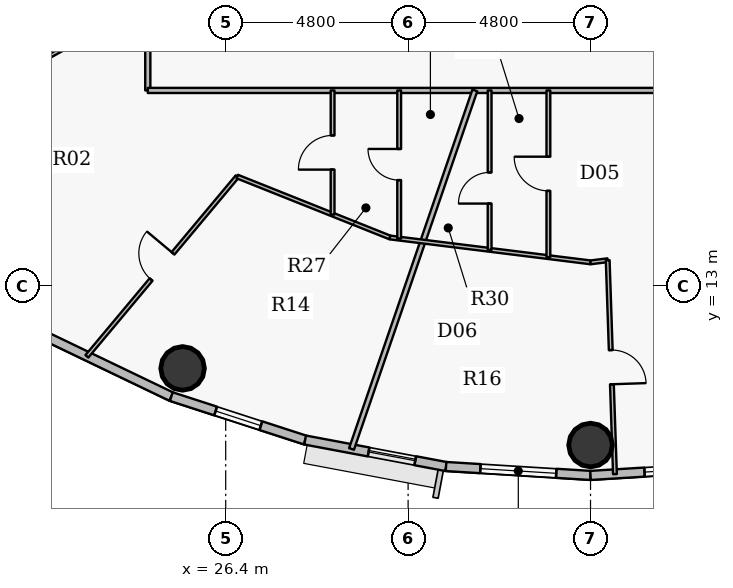
"""IFC4 building model, lengths in metres.
Left out: names, types, materials, properties, quantities, classifications, styles, units other than length and angle.
Written with IfcOpenShell. Run it as: python <this file> out.ifc"""

import sys

from ifc_helpers import new_model, si_unit, direction, frame, frame_2d, origin, origin_2d, place, context, subcontext, project, spatial, rectangle, hollow_circle, extrude, source, transform, mapped, element, fill, save


model = new_model("IFC4")
c1 = context("Model", 3, precision=1e-05, world=origin(), true_north=direction((0.0, 1.0)))
c2 = subcontext(c1, "Body", "Model", "MODEL_VIEW")
j1 = project(units=[si_unit("LENGTHUNIT", "METRE"), si_unit("PLANEANGLEUNIT", "RADIAN")], contexts=[c1])
p1 = place(None, origin())
s1 = spatial("IfcSite", under=j1, at=p1, CompositionType="ELEMENT")
p2 = place(p1, origin())
s2 = spatial("IfcBuilding", under=s1, at=p2, CompositionType="ELEMENT")
p3 = place(p2, frame((0.0, 0.0, 240.3)))
s3 = spatial("IfcBuildingStorey", under=s2, at=p3, CompositionType="ELEMENT", Elevation=240.3)
for number, where, z_axis, x_axis in (
    (1, (25.265, 10.836, 0.0), (0.0, 0.0, 1.0), (1.0, 0.0, 0.0)),
    (2, (36.0, 8.82, 0.0), (0.0, 0.0, 1.0), (1.0, 0.0, 0.0)),
):
    element("IfcColumn", number, at=place(p3, frame(where, z_axis=z_axis, x_axis=x_axis)), inside=s3, PredefinedType="COLUMN", context=c2, shape_type="SweptSolid", body=[
        extrude(hollow_circle(Radius=0.575, WallThickness=0.036, at=origin_2d()), origin(), (0.0, 0.0, 1.0), 3.75),
    ])
p4 = place(p3, frame((24.969, 10.094, 0.0), z_axis=(0.0, 0.0, 1.0), x_axis=(-0.901598104751, 0.432574684313, 0.0)))
e3 = element("IfcWall", 3, at=p4, inside=s3, PredefinedType="SOLIDWALL", context=c2, shape_type="SweptSolid", body=[
    extrude(rectangle(XDim=3.604, YDim=0.24, at=frame_2d((1.802, 0.0))), origin(), (0.0, 0.0, 1.0), 3.5),
])
p5 = place(p3, frame((28.491, 8.951, 0.0), z_axis=(0.0, 0.0, 1.0), x_axis=(-0.951210789182, 0.308541787354, 0.0)))
e4 = element("IfcWall", 4, at=p5, inside=s3, PredefinedType="SOLIDWALL", context=c2, shape_type="SweptSolid", body=[
    extrude(rectangle(XDim=3.702, YDim=0.24, at=frame_2d((1.851, 0.0))), origin(), (0.0, 0.0, 1.0), 3.5),
])
p6 = place(p5, frame((1.226, 0.0, 0.9)))
e5 = element("IfcOpeningElement", 5, at=p6, cuts=e4, PredefinedType="OPENING", context=c2, shape_type="SweptSolid", body=[
    extrude(rectangle(XDim=1.25, YDim=1.65, at=origin_2d()), frame((0.625, 0.13, 0.825), z_axis=(0.0, -1.0, 0.0), x_axis=(1.0, 0.0, 0.0)), (0.0, 0.0, 1.0), 0.26),
])
p7 = place(p3, frame((32.198, 8.254, 0.0), z_axis=(0.0, 0.0, 1.0), x_axis=(-0.982784898575, 0.184753465822, 0.0)))
e6 = element("IfcWall", 6, at=p7, inside=s3, PredefinedType="SOLIDWALL", context=c2, shape_type="SweptSolid", body=[
    extrude(rectangle(XDim=3.773, YDim=0.24, at=frame_2d((1.886, 0.0))), origin(), (0.0, 0.0, 1.0), 3.5),
])
p8 = place(p7, frame((0.824, 0.0, 0.9)))
e7 = element("IfcOpeningElement", 7, at=p8, cuts=e6, PredefinedType="OPENING", context=c2, shape_type="SweptSolid", body=[
    extrude(rectangle(XDim=1.25, YDim=1.65, at=origin_2d()), frame((0.625, 0.13, 0.825), z_axis=(0.0, -1.0, 0.0), x_axis=(1.0, 0.0, 0.0)), (0.0, 0.0, 1.0), 0.26),
])
p9 = place(p3, frame((36.0, 8.02, 0.0), z_axis=(0.0, 0.0, 1.0), x_axis=(-0.998108785312, 0.06147237333, 0.0)))
e8 = element("IfcWall", 8, at=p9, inside=s3, PredefinedType="SOLIDWALL", context=c2, shape_type="SweptSolid", body=[
    extrude(rectangle(XDim=3.809, YDim=0.24, at=frame_2d((1.904, 0.0))), origin(), (0.0, 0.0, 1.0), 3.5),
])
p10 = place(p9, frame((0.904, 0.0, 0.9)))
e9 = element("IfcOpeningElement", 9, at=p10, cuts=e8, PredefinedType="OPENING", context=c2, shape_type="SweptSolid", body=[
    extrude(rectangle(XDim=2.0, YDim=1.75, at=origin_2d()), frame((1.0, 0.13, 0.875), z_axis=(0.0, -1.0, 0.0), x_axis=(1.0, 0.0, 0.0)), (0.0, 0.0, 1.0), 0.26),
])
p11 = place(p3, frame((39.802, 8.254, 0.0), z_axis=(0.0, 0.0, 1.0), x_axis=(-0.998108785312, -0.06147237333, 0.0)))
e10 = element("IfcWall", 10, at=p11, inside=s3, PredefinedType="SOLIDWALL", context=c2, shape_type="SweptSolid", body=[
    extrude(rectangle(XDim=3.809, YDim=0.24, at=frame_2d((1.904, 0.0))), origin(), (0.0, 0.0, 1.0), 3.5),
])
p12 = place(p11, frame((0.785, 0.0, 0.9)))
e11 = element("IfcOpeningElement", 11, at=p12, cuts=e10, PredefinedType="OPENING", context=c2, shape_type="SweptSolid", body=[
    extrude(rectangle(XDim=1.6, YDim=1.75, at=origin_2d()), frame((0.8, 0.13, 0.875), z_axis=(0.0, -1.0, 0.0), x_axis=(1.0, 0.0, 0.0)), (0.0, 0.0, 1.0), 0.26),
])
p13 = place(p3, frame((16.25, 15.977, 0.0), z_axis=(0.0, 0.0, 1.0), x_axis=(0.87319302211, 0.487374543999, 0.0)))
e12 = element("IfcWall", 12, at=p13, inside=s3, PredefinedType="PARTITIONING", context=c2, shape_type="SweptSolid", body=[
    extrude(rectangle(XDim=6.712, YDim=0.1, at=frame_2d((3.356, 0.0))), origin(), (0.0, 0.0, 1.0), 2.985),
])
p14 = place(p13, frame((2.906, 0.0, 0.0)))
e13 = element("IfcOpeningElement", 13, at=p14, cuts=e12, PredefinedType="OPENING", context=c2, shape_type="SweptSolid", body=[
    extrude(rectangle(XDim=0.9, YDim=2.1, at=origin_2d()), frame((0.45, 0.06, 1.05), z_axis=(0.0, -1.0, 0.0), x_axis=(1.0, 0.0, 0.0)), (0.0, 0.0, 1.0), 0.12),
])
p15 = place(p3, frame((22.747, 11.154, 0.0), z_axis=(0.0, 0.0, 1.0), x_axis=(0.641565789242, 0.767068013982, 0.0)))
e14 = element("IfcWall", 14, at=p15, inside=s3, PredefinedType="PARTITIONING", context=c2, shape_type="SweptSolid", body=[
    extrude(rectangle(XDim=6.167, YDim=0.1, at=frame_2d((3.083, 0.0))), origin(), (0.0, 0.0, 1.0), 2.985),
])
p16 = place(p15, frame((2.633, 0.0, 0.0)))
e15 = element("IfcOpeningElement", 15, at=p16, cuts=e14, PredefinedType="OPENING", context=c2, shape_type="SweptSolid", body=[
    extrude(rectangle(XDim=0.9, YDim=2.1, at=origin_2d()), frame((0.45, 0.06, 1.05), z_axis=(0.0, -1.0, 0.0), x_axis=(1.0, 0.0, 0.0)), (0.0, 0.0, 1.0), 0.12),
])
p17 = place(p3, frame((24.35, 18.15, 0.0), z_axis=(0.0, 0.0, 1.0), x_axis=(0.0, 1.0, 0.0)))
e16 = element("IfcWall", 16, at=p17, inside=s3, PredefinedType="PARTITIONING", context=c2, shape_type="SweptSolid", body=[
    extrude(rectangle(XDim=7.163, YDim=0.135, at=frame_2d((3.581, 0.0))), origin(), (0.0, 0.0, 1.0), 2.935),
])
p18 = place(p17, frame((3.081, 0.0, 0.0)))
e17 = element("IfcOpeningElement", 17, at=p18, cuts=e16, PredefinedType="OPENING", context=c2, shape_type="SweptSolid", body=[
    extrude(rectangle(XDim=1.0, YDim=2.15, at=origin_2d()), frame((0.5, 0.078, 1.075), z_axis=(0.0, -1.0, 0.0), x_axis=(1.0, 0.0, 0.0)), (0.0, 0.0, 1.0), 0.155),
])
p19 = place(p3, frame((24.35, 18.15, 0.0), z_axis=(0.0, 0.0, 1.0), x_axis=(1.0, 0.0, 0.0)))
e18 = element("IfcWall", 18, at=p19, inside=s3, PredefinedType="PARTITIONING", context=c2, shape_type="SweptSolid", body=[
    extrude(rectangle(XDim=23.85, YDim=0.135, at=frame_2d((11.925, 0.0))), origin(), (0.0, 0.0, 1.0), 2.935),
])
p20 = place(p19, frame((14.838, 0.0, 0.0)))
e19 = element("IfcOpeningElement", 19, at=p20, cuts=e18, PredefinedType="OPENING", context=c2, shape_type="SweptSolid", body=[
    extrude(rectangle(XDim=1.0, YDim=2.15, at=origin_2d()), frame((0.5, 0.078, 1.075), z_axis=(0.0, -1.0, 0.0), x_axis=(1.0, 0.0, 0.0)), (0.0, 0.0, 1.0), 0.155),
])
p21 = place(p19, frame((21.472, 0.0, 0.0)))
e20 = element("IfcOpeningElement", 20, at=p21, cuts=e18, PredefinedType="OPENING", context=c2, shape_type="SweptSolid", body=[
    extrude(rectangle(XDim=1.0, YDim=2.15, at=origin_2d()), frame((0.5, 0.078, 1.075), z_axis=(0.0, -1.0, 0.0), x_axis=(1.0, 0.0, 0.0)), (0.0, 0.0, 1.0), 0.155),
])
p22 = place(p3, frame((26.703, 15.884, 0.0), z_axis=(0.0, 0.0, 1.0), x_axis=(0.928807108231, -0.370563564991, 0.0)))
e21 = element("IfcWall", 21, at=p22, inside=s3, PredefinedType="PARTITIONING", context=c2, shape_type="SweptSolid", body=[
    extrude(rectangle(XDim=4.327, YDim=0.1, at=frame_2d((2.163, 0.0))), origin(), (0.0, 0.0, 1.0), 2.935),
])
p23 = place(p3, frame((29.213, 14.883, 0.0), z_axis=(0.0, 0.0, 1.0), x_axis=(0.0, 1.0, 0.0)))
e22 = element("IfcWall", 22, at=p23, inside=s3, PredefinedType="PARTITIONING", context=c2, shape_type="SweptSolid", body=[
    extrude(rectangle(XDim=3.267, YDim=0.1, at=frame_2d((1.633, 0.0))), origin(), (0.0, 0.0, 1.0), 2.935),
])
p24 = place(p23, frame((1.183, 0.0, 0.0)))
e23 = element("IfcOpeningElement", 23, at=p24, cuts=e22, PredefinedType="OPENING", context=c2, shape_type="SweptSolid", body=[
    extrude(rectangle(XDim=0.9, YDim=2.1, at=origin_2d()), frame((0.45, 0.06, 1.05), z_axis=(0.0, -1.0, 0.0), x_axis=(1.0, 0.0, 0.0)), (0.0, 0.0, 1.0), 0.12),
])
p25 = place(p3, frame((29.711, 8.717, 0.0), z_axis=(0.0, 0.0, 1.0), x_axis=(0.325280852175, 0.945617452889, 0.0)))
e24 = element("IfcWall", 24, at=p25, inside=s3, PredefinedType="PARTITIONING", context=c2, shape_type="SweptSolid", body=[
    extrude(rectangle(XDim=9.976, YDim=0.135, at=frame_2d((4.988, 0.0))), origin(), (0.0, 0.0, 1.0), 2.985),
])
p26 = place(p3, frame((30.722, 14.281, 0.0), z_axis=(0.0, 0.0, 1.0), x_axis=(0.992398864395, -0.123062967412, 0.0)))
e25 = element("IfcWall", 25, at=p26, inside=s3, PredefinedType="PARTITIONING", context=c2, shape_type="SweptSolid", body=[
    extrude(rectangle(XDim=5.319, YDim=0.1, at=frame_2d((2.659, 0.0))), origin(), (0.0, 0.0, 1.0), 2.935),
])
p27 = place(p3, frame((30.965, 14.251, 0.0), z_axis=(0.0, 0.0, 1.0), x_axis=(0.0, 1.0, 0.0)))
e26 = element("IfcWall", 26, at=p27, inside=s3, PredefinedType="PARTITIONING", context=c2, shape_type="SweptSolid", body=[
    extrude(rectangle(XDim=3.899, YDim=0.1, at=frame_2d((1.949, 0.0))), origin(), (0.0, 0.0, 1.0), 3.5),
])
p28 = place(p27, frame((1.54, 0.0, 0.0)))
e27 = element("IfcOpeningElement", 27, at=p28, cuts=e26, PredefinedType="OPENING", context=c2, shape_type="SweptSolid", body=[
    extrude(rectangle(XDim=0.82, YDim=2.1, at=origin_2d()), frame((0.41, 0.06, 1.05), z_axis=(0.0, -1.0, 0.0), x_axis=(1.0, 0.0, 0.0)), (0.0, 0.0, 1.0), 0.12),
])
p29 = place(p3, frame((33.345, 13.956, 0.0), z_axis=(0.0, 0.0, 1.0), x_axis=(0.0, 1.0, 0.0)))
e28 = element("IfcWall", 28, at=p29, inside=s3, PredefinedType="PARTITIONING", context=c2, shape_type="SweptSolid", body=[
    extrude(rectangle(XDim=4.194, YDim=0.1, at=frame_2d((2.097, 0.0))), origin(), (0.0, 0.0, 1.0), 3.5),
])
p30 = place(p29, frame((1.217, 0.0, 0.0)))
e29 = element("IfcOpeningElement", 29, at=p30, cuts=e28, PredefinedType="OPENING", context=c2, shape_type="SweptSolid", body=[
    extrude(rectangle(XDim=0.82, YDim=2.1, at=origin_2d()), frame((0.41, 0.06, 1.05), z_axis=(0.0, -1.0, 0.0), x_axis=(1.0, 0.0, 0.0)), (0.0, 0.0, 1.0), 0.12),
])
p31 = place(p3, frame((34.891, 13.764, 0.0), z_axis=(0.0, 0.0, 1.0), x_axis=(0.0, 1.0, 0.0)))
e30 = element("IfcWall", 30, at=p31, inside=s3, PredefinedType="PARTITIONING", context=c2, shape_type="SweptSolid", body=[
    extrude(rectangle(XDim=4.386, YDim=0.1, at=frame_2d((2.193, 0.0))), origin(), (0.0, 0.0, 1.0), 3.5),
])
p32 = place(p31, frame((1.743, 0.0, 0.0)))
e31 = element("IfcOpeningElement", 31, at=p32, cuts=e30, PredefinedType="OPENING", context=c2, shape_type="SweptSolid", body=[
    extrude(rectangle(XDim=0.9, YDim=2.1, at=origin_2d()), frame((0.45, 0.06, 1.05), z_axis=(0.0, -1.0, 0.0), x_axis=(1.0, 0.0, 0.0)), (0.0, 0.0, 1.0), 0.12),
])
p33 = place(p3, frame((36.0, 13.626, 0.0), z_axis=(0.0, 0.0, 1.0), x_axis=(0.992368340182, 0.123308869931, 0.0)))
e32 = element("IfcWall", 32, at=p33, inside=s3, PredefinedType="PARTITIONING", context=c2, shape_type="SweptSolid", body=[
    extrude(rectangle(XDim=0.455, YDim=0.1, at=frame_2d((0.228, 0.0))), origin(), (0.0, 0.0, 1.0), 2.935),
])
p34 = place(p3, frame((36.452, 13.683, 0.0), z_axis=(0.0, 0.0, 1.0), x_axis=(0.033903801357, -0.999425100872, 0.0)))
e33 = element("IfcWall", 33, at=p34, inside=s3, PredefinedType="PARTITIONING", context=c2, shape_type="SweptSolid", body=[
    extrude(rectangle(XDim=5.631, YDim=0.1, at=frame_2d((2.815, 0.0))), origin(), (0.0, 0.0, 1.0), 2.985),
])
p35 = place(p34, frame((2.365, 0.0, 0.0)))
e34 = element("IfcOpeningElement", 34, at=p35, cuts=e33, PredefinedType="OPENING", context=c2, shape_type="SweptSolid", body=[
    extrude(rectangle(XDim=0.9, YDim=2.1, at=origin_2d()), frame((0.45, 0.06, 1.05), z_axis=(0.0, -1.0, 0.0), x_axis=(1.0, 0.0, 0.0)), (0.0, 0.0, 1.0), 0.12),
])
m1 = source(origin(), c2, "Body", "SweptSolid", [
    extrude(rectangle(XDim=1.25, YDim=1.65, at=origin_2d()), frame((0.625, 0.03, 0.825), z_axis=(0.0, -1.0, 0.0), x_axis=(1.0, 0.0, 0.0)), (0.0, 0.0, 1.0), 0.06),
])
p36 = place(p8, origin())
e35 = element("IfcWindow", 35, at=p36, inside=s3, PartitioningType="SINGLE_PANEL", PredefinedType="WINDOW", context=c2, shape_type="MappedRepresentation", body=[
    mapped(m1, transform((0.0, 0.0, 0.0), x_axis=(1.0, 0.0, 0.0), y_axis=(0.0, 1.0, 0.0), z_axis=(0.0, 0.0, 1.0), scale=1.0)),
])
fill(e7, e35)
m2 = source(origin(), c2, "Body", "SweptSolid", [
    extrude(rectangle(XDim=2.0, YDim=1.75, at=origin_2d()), frame((1.0, 0.03, 0.875), z_axis=(0.0, -1.0, 0.0), x_axis=(1.0, 0.0, 0.0)), (0.0, 0.0, 1.0), 0.06),
])
p37 = place(p10, origin())
e36 = element("IfcWindow", 36, at=p37, inside=s3, PartitioningType="DOUBLE_PANEL_VERTICAL", PredefinedType="WINDOW", context=c2, shape_type="MappedRepresentation", body=[
    mapped(m2, transform((0.0, 0.0, 0.0), x_axis=(1.0, 0.0, 0.0), y_axis=(0.0, 1.0, 0.0), z_axis=(0.0, 0.0, 1.0), scale=1.0)),
])
fill(e9, e36)
m3 = source(origin(), c2, "Body", "SweptSolid", [
    extrude(rectangle(XDim=1.6, YDim=1.75, at=origin_2d()), frame((0.8, 0.03, 0.875), z_axis=(0.0, -1.0, 0.0), x_axis=(1.0, 0.0, 0.0)), (0.0, 0.0, 1.0), 0.06),
])
p38 = place(p12, origin())
e37 = element("IfcWindow", 37, at=p38, inside=s3, PartitioningType="DOUBLE_PANEL_VERTICAL", PredefinedType="WINDOW", context=c2, shape_type="MappedRepresentation", body=[
    mapped(m3, transform((0.0, 0.0, 0.0), x_axis=(1.0, 0.0, 0.0), y_axis=(0.0, 1.0, 0.0), z_axis=(0.0, 0.0, 1.0), scale=1.0)),
])
fill(e11, e37)
p39 = place(p6, origin())
e38 = element("IfcWindow", 38, at=p39, inside=s3, PartitioningType="SINGLE_PANEL", PredefinedType="WINDOW", context=c2, shape_type="MappedRepresentation", body=[
    mapped(m1, transform((0.0, 0.0, 0.0), x_axis=(1.0, 0.0, 0.0), y_axis=(0.0, 1.0, 0.0), z_axis=(0.0, 0.0, 1.0), scale=1.0)),
])
fill(e5, e38)
m4 = source(origin(), c2, "Body", "SweptSolid", [
    extrude(rectangle(XDim=0.9, YDim=2.1, at=origin_2d()), frame((0.45, 0.025, 1.05), z_axis=(0.0, -1.0, 0.0), x_axis=(1.0, 0.0, 0.0)), (0.0, 0.0, 1.0), 0.05),
])
p40 = place(p16, origin())
e39 = element("IfcDoor", 39, at=p40, inside=s3, OperationType="SINGLE_SWING_RIGHT", PredefinedType="DOOR", context=c2, shape_type="MappedRepresentation", body=[
    mapped(m4, transform((0.0, 0.0, 0.0), x_axis=(1.0, 0.0, 0.0), y_axis=(0.0, 1.0, 0.0), z_axis=(0.0, 0.0, 1.0), scale=1.0)),
])
fill(e15, e39)
p41 = place(p24, origin())
e40 = element("IfcDoor", 40, at=p41, inside=s3, OperationType="SINGLE_SWING_LEFT", PredefinedType="DOOR", context=c2, shape_type="MappedRepresentation", body=[
    mapped(m4, transform((0.0, 0.0, 0.0), x_axis=(1.0, 0.0, 0.0), y_axis=(0.0, 1.0, 0.0), z_axis=(0.0, 0.0, 1.0), scale=1.0)),
])
fill(e23, e40)
m5 = source(origin(), c2, "Body", "SweptSolid", [
    extrude(rectangle(XDim=0.82, YDim=2.1, at=origin_2d()), frame((0.41, 0.025, 1.05), z_axis=(0.0, -1.0, 0.0), x_axis=(1.0, 0.0, 0.0)), (0.0, 0.0, 1.0), 0.05),
])
p42 = place(p28, origin())
e41 = element("IfcDoor", 41, at=p42, inside=s3, OperationType="SINGLE_SWING_RIGHT", PredefinedType="DOOR", context=c2, shape_type="MappedRepresentation", body=[
    mapped(m5, transform((0.0, 0.0, 0.0), x_axis=(1.0, 0.0, 0.0), y_axis=(0.0, 1.0, 0.0), z_axis=(0.0, 0.0, 1.0), scale=1.0)),
])
fill(e27, e41)
p43 = place(p35, origin())
e42 = element("IfcDoor", 42, at=p43, inside=s3, OperationType="SINGLE_SWING_RIGHT", PredefinedType="DOOR", context=c2, shape_type="MappedRepresentation", body=[
    mapped(m4, transform((0.0, 0.0, 0.0), x_axis=(1.0, 0.0, 0.0), y_axis=(0.0, 1.0, 0.0), z_axis=(0.0, 0.0, 1.0), scale=1.0)),
])
fill(e34, e42)
p44 = place(p32, origin())
e43 = element("IfcDoor", 43, at=p44, inside=s3, OperationType="SINGLE_SWING_RIGHT", PredefinedType="DOOR", context=c2, shape_type="MappedRepresentation", body=[
    mapped(m4, transform((0.0, 0.0, 0.0), x_axis=(1.0, 0.0, 0.0), y_axis=(0.0, 1.0, 0.0), z_axis=(0.0, 0.0, 1.0), scale=1.0)),
])
fill(e31, e43)
p45 = place(p30, origin())
e44 = element("IfcDoor", 44, at=p45, inside=s3, OperationType="SINGLE_SWING_LEFT", PredefinedType="DOOR", context=c2, shape_type="MappedRepresentation", body=[
    mapped(m5, transform((0.0, 0.0, 0.0), x_axis=(1.0, 0.0, 0.0), y_axis=(0.0, 1.0, 0.0), z_axis=(0.0, 0.0, 1.0), scale=1.0)),
])
fill(e29, e44)
save(model, sys.argv[1])
